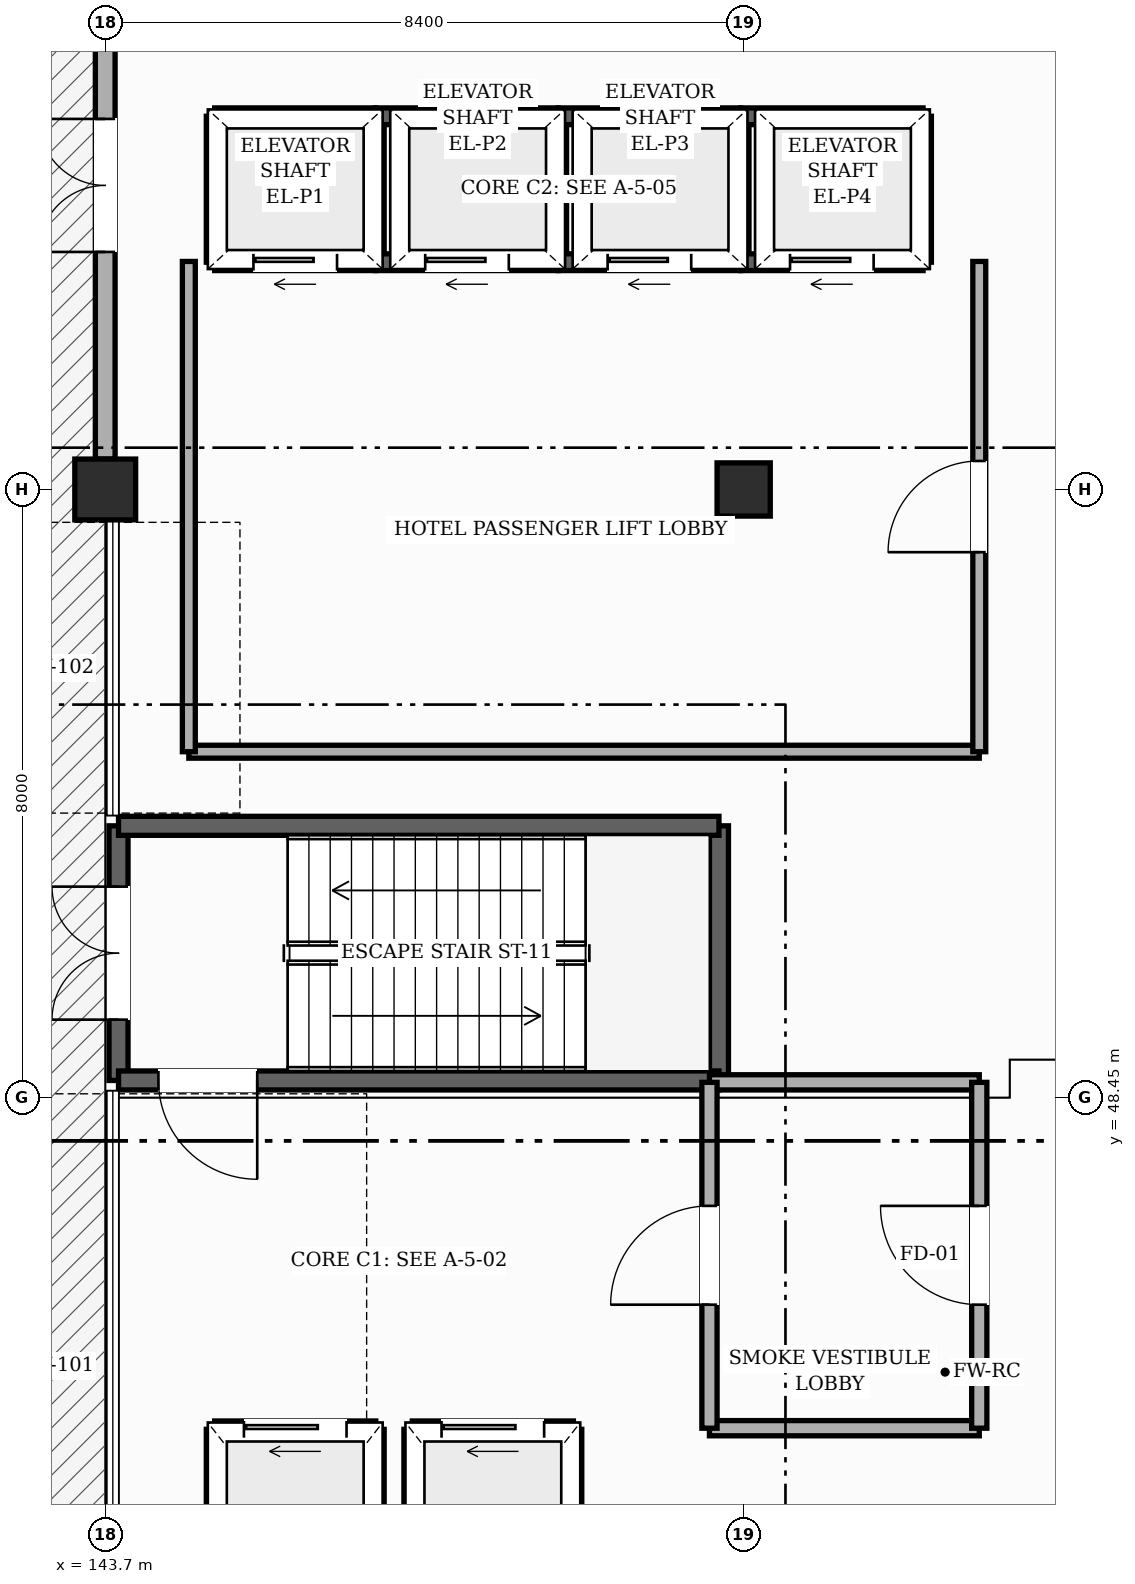
"""IFC4 building model, lengths in metres.
Left out: names, types, materials, properties, quantities, classifications, styles, units other than length and angle.
Written with IfcOpenShell. Run it as: python <this file> out.ifc"""

import sys

from ifc_helpers import new_model, si_unit, direction, frame, frame_2d, origin, origin_2d, place, context, subcontext, project, spatial, rectangle, hollow_rectangle, extrude, element, fill, save


model = new_model("IFC4")
c1 = context("Model", 3, precision=1e-05, world=origin(), true_north=direction((0.0, 1.0)))
c2 = subcontext(c1, "Body", "Model", "MODEL_VIEW")
j1 = project(units=[si_unit("LENGTHUNIT", "METRE"), si_unit("PLANEANGLEUNIT", "RADIAN")], contexts=[c1])
p1 = place(None, origin())
s1 = spatial("IfcSite", under=j1, at=p1, CompositionType="ELEMENT")
p2 = place(p1, origin())
s2 = spatial("IfcBuilding", under=s1, at=p2, CompositionType="ELEMENT")
p3 = place(p2, origin())
s3 = spatial("IfcBuildingStorey", under=s2, at=p3, CompositionType="ELEMENT", Elevation=0.0)
p4 = place(p3, frame((143.7, 56.45, 0.0), z_axis=(0.0, 0.0, 1.0), x_axis=(1.0, 0.0, 0.0)))
e1 = element("IfcColumn", 1, at=p4, inside=s3, PredefinedType="COLUMN", context=c2, shape_type="SweptSolid", body=[
    extrude(hollow_rectangle(XDim=0.8, YDim=0.8, WallThickness=0.032, InnerFilletRadius=0.032, OuterFilletRadius=0.064, at=origin_2d()), origin(), (0.0, 0.0, 1.0), 5.4),
])
p5 = place(p3, frame((152.1, 56.45, 0.0), z_axis=(0.0, 0.0, 1.0), x_axis=(1.0, 0.0, 0.0)))
e2 = element("IfcColumn", 2, at=p5, inside=s3, PredefinedType="COLUMN", context=c2, shape_type="SweptSolid", body=[
    extrude(hollow_rectangle(XDim=0.7, YDim=0.7, WallThickness=0.028, InnerFilletRadius=0.028, OuterFilletRadius=0.056, at=origin_2d()), origin(), (0.0, 0.0, 1.0), 5.4),
])
p6 = place(p3, frame((143.7, 56.85, 0.0), z_axis=(0.0, 0.0, 1.0), x_axis=(0.0, 1.0, 0.0)))
e3 = element("IfcWall", 3, at=p6, inside=s3, PredefinedType="SOLIDWALL", context=c2, shape_type="SweptSolid", body=[
    extrude(rectangle(XDim=7.2, YDim=0.26, at=frame_2d((3.6, 0.0))), origin(), (0.0, 0.0, 1.0), 4.575),
])
p7 = place(p6, frame((2.725, 0.0, 0.0)))
e4 = element("IfcOpeningElement", 4, at=p7, cuts=e3, PredefinedType="OPENING", context=c2, shape_type="SweptSolid", body=[
    extrude(rectangle(XDim=1.75, YDim=2.3, at=frame_2d((0.875, 1.15))), frame((0.0, 0.14, 0.0), z_axis=(0.0, -1.0, 0.0), x_axis=(1.0, 0.0, 0.0)), (0.0, 0.0, 1.0), 0.28),
])
p8 = place(p3, frame((143.875, 48.675, 0.0), z_axis=(0.0, 0.0, 1.0), x_axis=(0.0, 1.0, 0.0)))
e5 = element("IfcWall", 5, at=p8, inside=s3, PredefinedType="SHEAR", context=c2, shape_type="SweptSolid", body=[
    extrude(rectangle(XDim=3.35, YDim=0.25, at=frame_2d((1.675, 0.0))), origin(), (0.0, 0.0, 1.0), 5.15),
])
p9 = place(p8, frame((0.8, 0.0, 0.0)))
e6 = element("IfcOpeningElement", 6, at=p9, cuts=e5, PredefinedType="OPENING", context=c2, shape_type="SweptSolid", body=[
    extrude(rectangle(XDim=1.75, YDim=2.3, at=frame_2d((0.875, 1.15))), frame((0.0, 0.135, 0.0), z_axis=(0.0, -1.0, 0.0), x_axis=(1.0, 0.0, 0.0)), (0.0, 0.0, 1.0), 0.27),
])
p10 = place(p3, frame((151.775, 52.025, 0.0), z_axis=(0.0, 0.0, 1.0), x_axis=(0.0, -1.0, 0.0)))
e7 = element("IfcWall", 7, at=p10, inside=s3, PredefinedType="SHEAR", context=c2, shape_type="SweptSolid", body=[
    extrude(rectangle(XDim=3.35, YDim=0.25, at=frame_2d((1.675, 0.0))), origin(), (0.0, 0.0, 1.0), 5.15),
])
p11 = place(p3, frame((151.775, 48.675, 0.0), z_axis=(0.0, 0.0, 1.0), x_axis=(-1.0, 0.0, 0.0)))
e8 = element("IfcWall", 8, at=p11, inside=s3, PredefinedType="SHEAR", context=c2, shape_type="SweptSolid", body=[
    extrude(rectangle(XDim=7.9, YDim=0.25, at=frame_2d((3.95, 0.0))), origin(), (0.0, 0.0, 1.0), 5.15),
])
p12 = place(p11, frame((6.075, 0.0, 0.0)))
e9 = element("IfcOpeningElement", 9, at=p12, cuts=e8, PredefinedType="OPENING", context=c2, shape_type="SweptSolid", body=[
    extrude(rectangle(XDim=1.3, YDim=2.2, at=frame_2d((0.65, 1.1))), frame((0.0, 0.135, 0.0), z_axis=(0.0, -1.0, 0.0), x_axis=(1.0, 0.0, 0.0)), (0.0, 0.0, 1.0), 0.27),
])
p13 = place(p3, frame((143.875, 52.025, 0.0), z_axis=(0.0, 0.0, 1.0), x_axis=(1.0, 0.0, 0.0)))
e10 = element("IfcWall", 10, at=p13, inside=s3, PredefinedType="SHEAR", context=c2, shape_type="SweptSolid", body=[
    extrude(rectangle(XDim=7.9, YDim=0.25, at=frame_2d((3.95, 0.0))), origin(), (0.0, 0.0, 1.0), 5.15),
])
p14 = place(p3, frame((145.14, 44.085, 0.0), z_axis=(0.0, 0.0, 1.0), x_axis=(1.0, 0.0, 0.0)))
e11 = element("IfcWall", 11, at=p14, inside=s3, PredefinedType="SHEAR", context=c2, shape_type="SweptSolid", body=[
    extrude(rectangle(XDim=2.12, YDim=0.22, at=frame_2d((1.06, 0.0))), origin(), (0.0, 0.0, 1.0), 5.15),
])
p15 = place(p14, frame((0.385, 0.0, 0.0)))
e12 = element("IfcOpeningElement", 12, at=p15, cuts=e11, PredefinedType="OPENING", context=c2, shape_type="SweptSolid", body=[
    extrude(rectangle(XDim=1.35, YDim=2.3, at=frame_2d((0.675, 1.15))), frame((0.0, 0.12, 0.0), z_axis=(0.0, -1.0, 0.0), x_axis=(1.0, 0.0, 0.0)), (0.0, 0.0, 1.0), 0.24),
])
for number, where, z_axis, x_axis in (
    (13, (147.26, 41.315, 0.0), (0.0, 0.0, 1.0), (0.0, 1.0, 0.0)),
    (14, (145.14, 41.315, 0.0), (0.0, 0.0, 1.0), (0.0, 1.0, 0.0)),
):
    element("IfcWall", number, at=place(p3, frame(where, z_axis=z_axis, x_axis=x_axis)), inside=s3, PredefinedType="SHEAR", context=c2, shape_type="SweptSolid", body=[
        extrude(rectangle(XDim=2.77, YDim=0.22, at=frame_2d((1.385, 0.0))), origin(), (0.0, 0.0, 1.0), 5.15),
    ])
p16 = place(p3, frame((147.74, 44.085, 0.0), z_axis=(0.0, 0.0, 1.0), x_axis=(1.0, 0.0, 0.0)))
e15 = element("IfcWall", 15, at=p16, inside=s3, PredefinedType="SHEAR", context=c2, shape_type="SweptSolid", body=[
    extrude(rectangle(XDim=2.12, YDim=0.22, at=frame_2d((1.06, 0.0))), origin(), (0.0, 0.0, 1.0), 5.15),
])
p17 = place(p16, frame((0.385, 0.0, 0.0)))
e16 = element("IfcOpeningElement", 16, at=p17, cuts=e15, PredefinedType="OPENING", context=c2, shape_type="SweptSolid", body=[
    extrude(rectangle(XDim=1.35, YDim=2.3, at=frame_2d((0.675, 1.15))), frame((0.0, 0.12, 0.0), z_axis=(0.0, -1.0, 0.0), x_axis=(1.0, 0.0, 0.0)), (0.0, 0.0, 1.0), 0.24),
])
for number, where, z_axis, x_axis in (
    (17, (149.86, 41.315, 0.0), (0.0, 0.0, 1.0), (0.0, 1.0, 0.0)),
    (18, (147.74, 41.315, 0.0), (0.0, 0.0, 1.0), (0.0, 1.0, 0.0)),
):
    element("IfcWall", number, at=place(p3, frame(where, z_axis=z_axis, x_axis=x_axis)), inside=s3, PredefinedType="SHEAR", context=c2, shape_type="SweptSolid", body=[
        extrude(rectangle(XDim=2.77, YDim=0.22, at=frame_2d((1.385, 0.0))), origin(), (0.0, 0.0, 1.0), 5.15),
    ])
p18 = place(p3, frame((145.14, 61.36, 0.0), z_axis=(0.0, 0.0, 1.0), x_axis=(1.0, 0.0, 0.0)))
e19 = element("IfcWall", 19, at=p18, inside=s3, PredefinedType="SHEAR", context=c2, shape_type="SweptSolid", body=[
    extrude(rectangle(XDim=2.12, YDim=0.22, at=frame_2d((1.06, 0.0))), origin(), (0.0, 0.0, 1.0), 5.15),
])
p19 = place(p3, frame((145.14, 59.44, 0.0), z_axis=(0.0, 0.0, 1.0), x_axis=(1.0, 0.0, 0.0)))
e20 = element("IfcWall", 20, at=p19, inside=s3, PredefinedType="SHEAR", context=c2, shape_type="SweptSolid", body=[
    extrude(rectangle(XDim=2.12, YDim=0.22, at=frame_2d((1.06, 0.0))), origin(), (0.0, 0.0, 1.0), 5.15),
])
p20 = place(p19, frame((0.51, 0.0, 0.0)))
e21 = element("IfcOpeningElement", 21, at=p20, cuts=e20, PredefinedType="OPENING", context=c2, shape_type="SweptSolid", body=[
    extrude(rectangle(XDim=1.1, YDim=2.2, at=frame_2d((0.55, 1.1))), frame((0.0, 0.12, 0.0), z_axis=(0.0, -1.0, 0.0), x_axis=(1.0, 0.0, 0.0)), (0.0, 0.0, 1.0), 0.24),
])
for number, where, z_axis, x_axis in (
    (22, (147.26, 59.44, 0.0), (0.0, 0.0, 1.0), (0.0, 1.0, 0.0)),
    (23, (145.14, 59.44, 0.0), (0.0, 0.0, 1.0), (0.0, 1.0, 0.0)),
):
    element("IfcWall", number, at=place(p3, frame(where, z_axis=z_axis, x_axis=x_axis)), inside=s3, PredefinedType="SHEAR", context=c2, shape_type="SweptSolid", body=[
        extrude(rectangle(XDim=1.92, YDim=0.22, at=frame_2d((0.96, 0.0))), origin(), (0.0, 0.0, 1.0), 5.15),
    ])
p21 = place(p3, frame((147.26, 61.36, 0.0), z_axis=(0.0, 0.0, 1.0), x_axis=(1.0, 0.0, 0.0)))
e24 = element("IfcWall", 24, at=p21, inside=s3, PredefinedType="SHEAR", context=c2, shape_type="SweptSolid", body=[
    extrude(rectangle(XDim=2.4, YDim=0.22, at=frame_2d((1.2, 0.0))), origin(), (0.0, 0.0, 1.0), 5.15),
])
p22 = place(p3, frame((147.26, 59.44, 0.0), z_axis=(0.0, 0.0, 1.0), x_axis=(1.0, 0.0, 0.0)))
e25 = element("IfcWall", 25, at=p22, inside=s3, PredefinedType="SHEAR", context=c2, shape_type="SweptSolid", body=[
    extrude(rectangle(XDim=2.4, YDim=0.22, at=frame_2d((1.2, 0.0))), origin(), (0.0, 0.0, 1.0), 5.15),
])
p23 = place(p22, frame((0.65, 0.0, 0.0)))
e26 = element("IfcOpeningElement", 26, at=p23, cuts=e25, PredefinedType="OPENING", context=c2, shape_type="SweptSolid", body=[
    extrude(rectangle(XDim=1.1, YDim=2.2, at=frame_2d((0.55, 1.1))), frame((0.0, 0.12, 0.0), z_axis=(0.0, -1.0, 0.0), x_axis=(1.0, 0.0, 0.0)), (0.0, 0.0, 1.0), 0.24),
])
p24 = place(p3, frame((149.66, 59.44, 0.0), z_axis=(0.0, 0.0, 1.0), x_axis=(0.0, 1.0, 0.0)))
e27 = element("IfcWall", 27, at=p24, inside=s3, PredefinedType="SHEAR", context=c2, shape_type="SweptSolid", body=[
    extrude(rectangle(XDim=1.92, YDim=0.22, at=frame_2d((0.96, 0.0))), origin(), (0.0, 0.0, 1.0), 5.15),
])
p25 = place(p3, frame((149.66, 61.36, 0.0), z_axis=(0.0, 0.0, 1.0), x_axis=(1.0, 0.0, 0.0)))
e28 = element("IfcWall", 28, at=p25, inside=s3, PredefinedType="SHEAR", context=c2, shape_type="SweptSolid", body=[
    extrude(rectangle(XDim=2.4, YDim=0.22, at=frame_2d((1.2, 0.0))), origin(), (0.0, 0.0, 1.0), 5.15),
])
p26 = place(p3, frame((149.66, 59.44, 0.0), z_axis=(0.0, 0.0, 1.0), x_axis=(1.0, 0.0, 0.0)))
e29 = element("IfcWall", 29, at=p26, inside=s3, PredefinedType="SHEAR", context=c2, shape_type="SweptSolid", body=[
    extrude(rectangle(XDim=2.4, YDim=0.22, at=frame_2d((1.2, 0.0))), origin(), (0.0, 0.0, 1.0), 5.15),
])
p27 = place(p26, frame((0.65, 0.0, 0.0)))
e30 = element("IfcOpeningElement", 30, at=p27, cuts=e29, PredefinedType="OPENING", context=c2, shape_type="SweptSolid", body=[
    extrude(rectangle(XDim=1.1, YDim=2.2, at=frame_2d((0.55, 1.1))), frame((0.0, 0.12, 0.0), z_axis=(0.0, -1.0, 0.0), x_axis=(1.0, 0.0, 0.0)), (0.0, 0.0, 1.0), 0.24),
])
p28 = place(p3, frame((152.06, 59.44, 0.0), z_axis=(0.0, 0.0, 1.0), x_axis=(0.0, 1.0, 0.0)))
e31 = element("IfcWall", 31, at=p28, inside=s3, PredefinedType="SHEAR", context=c2, shape_type="SweptSolid", body=[
    extrude(rectangle(XDim=1.92, YDim=0.22, at=frame_2d((0.96, 0.0))), origin(), (0.0, 0.0, 1.0), 5.15),
])
p29 = place(p3, frame((152.06, 61.36, 0.0), z_axis=(0.0, 0.0, 1.0), x_axis=(1.0, 0.0, 0.0)))
e32 = element("IfcWall", 32, at=p29, inside=s3, PredefinedType="SHEAR", context=c2, shape_type="SweptSolid", body=[
    extrude(rectangle(XDim=2.4, YDim=0.22, at=frame_2d((1.2, 0.0))), origin(), (0.0, 0.0, 1.0), 5.15),
])
p30 = place(p3, frame((152.06, 59.44, 0.0), z_axis=(0.0, 0.0, 1.0), x_axis=(1.0, 0.0, 0.0)))
e33 = element("IfcWall", 33, at=p30, inside=s3, PredefinedType="SHEAR", context=c2, shape_type="SweptSolid", body=[
    extrude(rectangle(XDim=2.4, YDim=0.22, at=frame_2d((1.2, 0.0))), origin(), (0.0, 0.0, 1.0), 5.15),
])
p31 = place(p30, frame((0.65, 0.0, 0.0)))
e34 = element("IfcOpeningElement", 34, at=p31, cuts=e33, PredefinedType="OPENING", context=c2, shape_type="SweptSolid", body=[
    extrude(rectangle(XDim=1.1, YDim=2.2, at=frame_2d((0.55, 1.1))), frame((0.0, 0.12, 0.0), z_axis=(0.0, -1.0, 0.0), x_axis=(1.0, 0.0, 0.0)), (0.0, 0.0, 1.0), 0.24),
])
p32 = place(p3, frame((154.46, 59.44, 0.0), z_axis=(0.0, 0.0, 1.0), x_axis=(0.0, 1.0, 0.0)))
e35 = element("IfcWall", 35, at=p32, inside=s3, PredefinedType="SHEAR", context=c2, shape_type="SweptSolid", body=[
    extrude(rectangle(XDim=1.92, YDim=0.22, at=frame_2d((0.96, 0.0))), origin(), (0.0, 0.0, 1.0), 5.15),
])
for number, where, z_axis, x_axis in (
    (36, (151.65, 44.1, 0.0), (0.0, 0.0, 1.0), (1.0, 0.0, 0.0)),
    (37, (151.65, 48.65, 0.0), (0.0, 0.0, 1.0), (1.0, 0.0, 0.0)),
):
    element("IfcWall", number, at=place(p3, frame(where, z_axis=z_axis, x_axis=x_axis)), inside=s3, PredefinedType="SOLIDWALL", context=c2, shape_type="SweptSolid", body=[
        extrude(rectangle(XDim=3.55, YDim=0.2, at=frame_2d((1.775, 0.0))), origin(), (0.0, 0.0, 1.0), 5.135),
    ])
p33 = place(p3, frame((144.8, 53.0, 0.0), z_axis=(0.0, 0.0, 1.0), x_axis=(1.0, 0.0, 0.0)))
e38 = element("IfcWall", 38, at=p33, inside=s3, PredefinedType="PARTITIONING", context=c2, shape_type="SweptSolid", body=[
    extrude(rectangle(XDim=10.4, YDim=0.17, at=frame_2d((5.2, 0.0))), origin(), (0.0, 0.0, 1.0), 5.135),
])
p34 = place(p3, frame((144.8, 53.0, 0.0), z_axis=(0.0, 0.0, 1.0), x_axis=(0.0, 1.0, 0.0)))
e39 = element("IfcWall", 39, at=p34, inside=s3, PredefinedType="PARTITIONING", context=c2, shape_type="SweptSolid", body=[
    extrude(rectangle(XDim=6.45, YDim=0.17, at=frame_2d((3.225, 0.0))), origin(), (0.0, 0.0, 1.0), 5.135),
])
p35 = place(p3, frame((151.65, 44.1, 0.0), z_axis=(0.0, 0.0, 1.0), x_axis=(0.0, 1.0, 0.0)))
e40 = element("IfcWall", 40, at=p35, inside=s3, PredefinedType="SOLIDWALL", context=c2, shape_type="SweptSolid", body=[
    extrude(rectangle(XDim=4.55, YDim=0.2, at=frame_2d((2.275, 0.0))), origin(), (0.0, 0.0, 1.0), 5.135),
])
p36 = place(p35, frame((1.625, 0.0, 0.0)))
e41 = element("IfcOpeningElement", 41, at=p36, cuts=e40, PredefinedType="OPENING", context=c2, shape_type="SweptSolid", body=[
    extrude(rectangle(XDim=1.3, YDim=2.2, at=frame_2d((0.65, 1.1))), frame((0.0, 0.11, 0.0), z_axis=(0.0, -1.0, 0.0), x_axis=(1.0, 0.0, 0.0)), (0.0, 0.0, 1.0), 0.22),
])
p37 = place(p3, frame((155.2, 44.1, 0.0), z_axis=(0.0, 0.0, 1.0), x_axis=(0.0, 1.0, 0.0)))
e42 = element("IfcWall", 42, at=p37, inside=s3, PredefinedType="SOLIDWALL", context=c2, shape_type="SweptSolid", body=[
    extrude(rectangle(XDim=4.55, YDim=0.2, at=frame_2d((2.275, 0.0))), origin(), (0.0, 0.0, 1.0), 5.135),
])
p38 = place(p37, frame((1.625, 0.0, 0.0)))
e43 = element("IfcOpeningElement", 43, at=p38, cuts=e42, PredefinedType="OPENING", context=c2, shape_type="SweptSolid", body=[
    extrude(rectangle(XDim=1.3, YDim=2.2, at=frame_2d((0.65, 1.1))), frame((0.0, 0.11, 0.0), z_axis=(0.0, -1.0, 0.0), x_axis=(1.0, 0.0, 0.0)), (0.0, 0.0, 1.0), 0.22),
])
p39 = place(p3, frame((155.2, 53.0, 0.0), z_axis=(0.0, 0.0, 1.0), x_axis=(0.0, 1.0, 0.0)))
e44 = element("IfcWall", 44, at=p39, inside=s3, PredefinedType="PARTITIONING", context=c2, shape_type="SweptSolid", body=[
    extrude(rectangle(XDim=6.45, YDim=0.17, at=frame_2d((3.225, 0.0))), origin(), (0.0, 0.0, 1.0), 5.135),
])
p40 = place(p39, frame((2.625, 0.0, 0.0)))
e45 = element("IfcOpeningElement", 45, at=p40, cuts=e44, PredefinedType="OPENING", context=c2, shape_type="SweptSolid", body=[
    extrude(rectangle(XDim=1.2, YDim=2.2, at=frame_2d((0.6, 1.1))), frame((0.0, 0.095, 0.0), z_axis=(0.0, -1.0, 0.0), x_axis=(1.0, 0.0, 0.0)), (0.0, 0.0, 1.0), 0.19),
])
p41 = place(p7, origin())
e46 = element("IfcDoor", 46, at=p41, inside=s3, OperationType="DOUBLE_DOOR_SINGLE_SWING", PredefinedType="DOOR", context=c2, shape_type="SweptSolid", body=[
    extrude(rectangle(XDim=1.75, YDim=2.3, at=frame_2d((0.875, 1.15))), frame((0.0, 0.025, 0.0), z_axis=(0.0, -1.0, 0.0), x_axis=(1.0, 0.0, 0.0)), (0.0, 0.0, 1.0), 0.05),
])
fill(e4, e46)
p42 = place(p9, origin())
e47 = element("IfcDoor", 47, at=p42, inside=s3, OperationType="DOUBLE_DOOR_SINGLE_SWING", PredefinedType="DOOR", context=c2, shape_type="SweptSolid", body=[
    extrude(rectangle(XDim=1.75, YDim=2.3, at=frame_2d((0.875, 1.15))), frame((0.0, 0.025, 0.0), z_axis=(0.0, -1.0, 0.0), x_axis=(1.0, 0.0, 0.0)), (0.0, 0.0, 1.0), 0.05),
])
fill(e6, e47)
p43 = place(p12, origin())
e48 = element("IfcDoor", 48, at=p43, inside=s3, OperationType="SINGLE_SWING_LEFT", PredefinedType="DOOR", context=c2, shape_type="SweptSolid", body=[
    extrude(rectangle(XDim=1.3, YDim=2.2, at=frame_2d((0.65, 1.1))), frame((0.0, 0.025, 0.0), z_axis=(0.0, -1.0, 0.0), x_axis=(1.0, 0.0, 0.0)), (0.0, 0.0, 1.0), 0.05),
])
fill(e9, e48)
p44 = place(p15, origin())
e49 = element("IfcDoor", 49, at=p44, inside=s3, OperationType="SLIDING_TO_LEFT", PredefinedType="DOOR", context=c2, shape_type="SweptSolid", body=[
    extrude(rectangle(XDim=1.35, YDim=2.3, at=frame_2d((0.675, 1.15))), frame((0.0, 0.025, 0.0), z_axis=(0.0, -1.0, 0.0), x_axis=(1.0, 0.0, 0.0)), (0.0, 0.0, 1.0), 0.05),
])
fill(e12, e49)
p45 = place(p17, origin())
e50 = element("IfcDoor", 50, at=p45, inside=s3, OperationType="SLIDING_TO_LEFT", PredefinedType="DOOR", context=c2, shape_type="SweptSolid", body=[
    extrude(rectangle(XDim=1.35, YDim=2.3, at=frame_2d((0.675, 1.15))), frame((0.0, 0.025, 0.0), z_axis=(0.0, -1.0, 0.0), x_axis=(1.0, 0.0, 0.0)), (0.0, 0.0, 1.0), 0.05),
])
fill(e16, e50)
p46 = place(p20, origin())
e51 = element("IfcDoor", 51, at=p46, inside=s3, OperationType="SLIDING_TO_LEFT", PredefinedType="DOOR", context=c2, shape_type="SweptSolid", body=[
    extrude(rectangle(XDim=1.1, YDim=2.2, at=frame_2d((0.55, 1.1))), frame((0.0, 0.025, 0.0), z_axis=(0.0, -1.0, 0.0), x_axis=(1.0, 0.0, 0.0)), (0.0, 0.0, 1.0), 0.05),
])
fill(e21, e51)
p47 = place(p23, origin())
e52 = element("IfcDoor", 52, at=p47, inside=s3, OperationType="SLIDING_TO_LEFT", PredefinedType="DOOR", context=c2, shape_type="SweptSolid", body=[
    extrude(rectangle(XDim=1.1, YDim=2.2, at=frame_2d((0.55, 1.1))), frame((0.0, 0.025, 0.0), z_axis=(0.0, -1.0, 0.0), x_axis=(1.0, 0.0, 0.0)), (0.0, 0.0, 1.0), 0.05),
])
fill(e26, e52)
p48 = place(p27, origin())
e53 = element("IfcDoor", 53, at=p48, inside=s3, OperationType="SLIDING_TO_LEFT", PredefinedType="DOOR", context=c2, shape_type="SweptSolid", body=[
    extrude(rectangle(XDim=1.1, YDim=2.2, at=frame_2d((0.55, 1.1))), frame((0.0, 0.025, 0.0), z_axis=(0.0, -1.0, 0.0), x_axis=(1.0, 0.0, 0.0)), (0.0, 0.0, 1.0), 0.05),
])
fill(e30, e53)
p49 = place(p31, origin())
e54 = element("IfcDoor", 54, at=p49, inside=s3, OperationType="SLIDING_TO_LEFT", PredefinedType="DOOR", context=c2, shape_type="SweptSolid", body=[
    extrude(rectangle(XDim=1.1, YDim=2.2, at=frame_2d((0.55, 1.1))), frame((0.0, 0.025, 0.0), z_axis=(0.0, -1.0, 0.0), x_axis=(1.0, 0.0, 0.0)), (0.0, 0.0, 1.0), 0.05),
])
fill(e34, e54)
p50 = place(p36, origin())
e55 = element("IfcDoor", 55, at=p50, inside=s3, OperationType="SINGLE_SWING_LEFT", PredefinedType="DOOR", context=c2, shape_type="SweptSolid", body=[
    extrude(rectangle(XDim=1.3, YDim=2.2, at=frame_2d((0.65, 1.1))), frame((0.0, 0.025, 0.0), z_axis=(0.0, -1.0, 0.0), x_axis=(1.0, 0.0, 0.0)), (0.0, 0.0, 1.0), 0.05),
])
fill(e41, e55)
p51 = place(p38, origin())
e56 = element("IfcDoor", 56, at=p51, inside=s3, OperationType="SINGLE_SWING_RIGHT", PredefinedType="DOOR", context=c2, shape_type="SweptSolid", body=[
    extrude(rectangle(XDim=1.3, YDim=2.2, at=frame_2d((0.65, 1.1))), frame((0.0, 0.025, 0.0), z_axis=(0.0, -1.0, 0.0), x_axis=(1.0, 0.0, 0.0)), (0.0, 0.0, 1.0), 0.05),
])
fill(e43, e56)
p52 = place(p40, origin())
e57 = element("IfcDoor", 57, at=p52, inside=s3, OperationType="SINGLE_SWING_LEFT", PredefinedType="DOOR", context=c2, shape_type="SweptSolid", body=[
    extrude(rectangle(XDim=1.2, YDim=2.2, at=frame_2d((0.6, 1.1))), frame((0.0, 0.025, 0.0), z_axis=(0.0, -1.0, 0.0), x_axis=(1.0, 0.0, 0.0)), (0.0, 0.0, 1.0), 0.05),
])
fill(e45, e57)
save(model, sys.argv[1])
